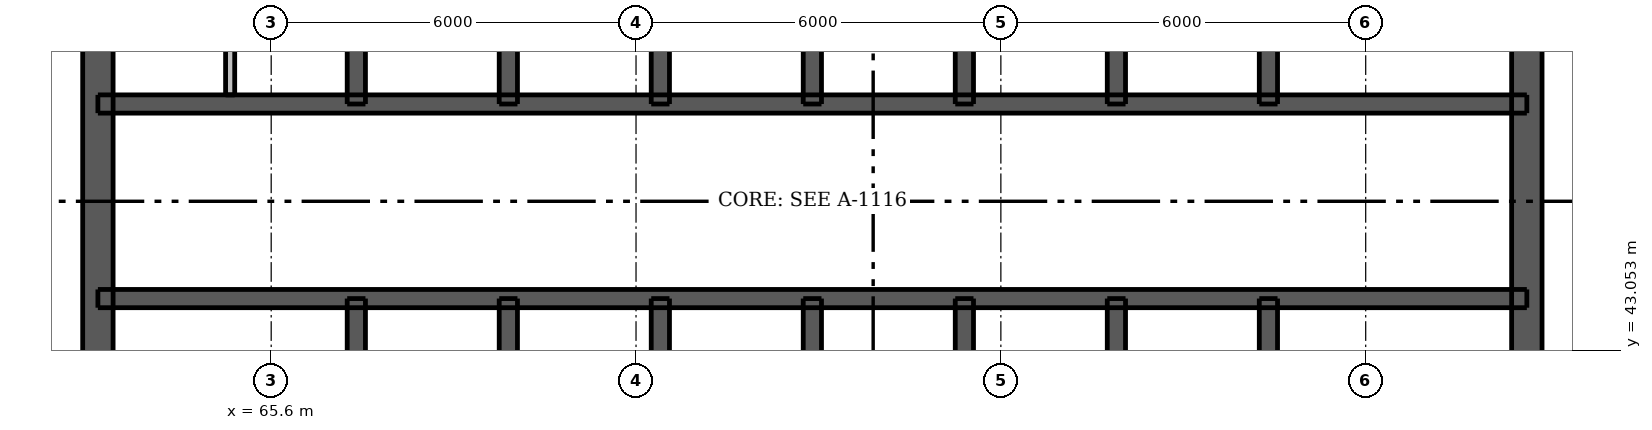
"""IFC4 building model, lengths in metres.
Left out: names, types, materials, properties, quantities, classifications, styles, units other than length and angle.
Written with IfcOpenShell. Run it as: python <this file> out.ifc"""

import sys

from ifc_helpers import new_model, si_unit, direction, frame, frame_2d, origin, place, context, subcontext, project, spatial, rectangle, extrude, element, fill, save


model = new_model("IFC4")
c1 = context("Model", 3, precision=1e-05, world=origin(), true_north=direction((0.0, 1.0)))
c2 = subcontext(c1, "Body", "Model", "MODEL_VIEW")
j1 = project(units=[si_unit("LENGTHUNIT", "METRE"), si_unit("PLANEANGLEUNIT", "RADIAN")], contexts=[c1])
p1 = place(None, origin())
s1 = spatial("IfcSite", under=j1, at=p1, CompositionType="ELEMENT")
p2 = place(p1, origin())
s2 = spatial("IfcBuilding", under=s1, at=p2, CompositionType="ELEMENT")
p3 = place(p2, frame((0.0, 0.0, 242.2)))
s3 = spatial("IfcBuildingStorey", under=s2, at=p3, CompositionType="ELEMENT", Elevation=242.2)
p4 = place(p3, frame((62.75, 33.5, 0.0), z_axis=(0.0, 0.0, 1.0), x_axis=(0.0, 1.0, 0.0)))
e1 = element("IfcWall", 1, at=p4, inside=s3, PredefinedType="SHEAR", context=c2, shape_type="SweptSolid", body=[
    extrude(rectangle(XDim=24.0, YDim=0.5, at=frame_2d((12.0, 0.0))), origin(), (0.0, 0.0, 1.0), 3.05),
])
p5 = place(p4, frame((11.2, 0.0, 0.0)))
e2 = element("IfcOpeningElement", 2, at=p5, cuts=e1, PredefinedType="OPENING", context=c2, shape_type="SweptSolid", body=[
    extrude(rectangle(XDim=1.6, YDim=2.1, at=frame_2d((0.8, 1.05))), frame((0.0, 0.26, 0.0), z_axis=(0.0, -1.0, 0.0), x_axis=(1.0, 0.0, 0.0)), (0.0, 0.0, 1.0), 0.52),
])
p6 = place(p3, frame((86.25, 33.5, 0.0), z_axis=(0.0, 0.0, 1.0), x_axis=(0.0, 1.0, 0.0)))
e3 = element("IfcWall", 3, at=p6, inside=s3, PredefinedType="SHEAR", context=c2, shape_type="SweptSolid", body=[
    extrude(rectangle(XDim=24.0, YDim=0.5, at=frame_2d((12.0, 0.0))), origin(), (0.0, 0.0, 1.0), 3.05),
])
p7 = place(p6, frame((11.2, 0.0, 0.0)))
e4 = element("IfcOpeningElement", 4, at=p7, cuts=e3, PredefinedType="OPENING", context=c2, shape_type="SweptSolid", body=[
    extrude(rectangle(XDim=1.6, YDim=2.1, at=frame_2d((0.8, 1.05))), frame((0.0, 0.26, 0.0), z_axis=(0.0, -1.0, 0.0), x_axis=(1.0, 0.0, 0.0)), (0.0, 0.0, 1.0), 0.52),
])
p8 = place(p3, frame((62.75, 43.9, 0.0), z_axis=(0.0, 0.0, 1.0), x_axis=(1.0, 0.0, 0.0)))
e5 = element("IfcWall", 5, at=p8, inside=s3, PredefinedType="SHEAR", context=c2, shape_type="SweptSolid", body=[
    extrude(rectangle(XDim=23.5, YDim=0.3, at=frame_2d((11.75, 0.0))), origin(), (0.0, 0.0, 1.0), 3.05),
])
p9 = place(p8, frame((1.725, 0.0, 0.0)))
e6 = element("IfcOpeningElement", 6, at=p9, cuts=e5, PredefinedType="OPENING", context=c2, shape_type="SweptSolid", body=[
    extrude(rectangle(XDim=0.9, YDim=2.1, at=frame_2d((0.45, 1.05))), frame((0.0, 0.16, 0.0), z_axis=(0.0, -1.0, 0.0), x_axis=(1.0, 0.0, 0.0)), (0.0, 0.0, 1.0), 0.32),
])
p10 = place(p8, frame((20.875, 0.0, 0.0)))
e7 = element("IfcOpeningElement", 7, at=p10, cuts=e5, PredefinedType="OPENING", context=c2, shape_type="SweptSolid", body=[
    extrude(rectangle(XDim=0.9, YDim=2.1, at=frame_2d((0.45, 1.05))), frame((0.0, 0.16, 0.0), z_axis=(0.0, -1.0, 0.0), x_axis=(1.0, 0.0, 0.0)), (0.0, 0.0, 1.0), 0.32),
])
p11 = place(p8, frame((7.55, 0.0, 0.0)))
e8 = element("IfcOpeningElement", 8, at=p11, cuts=e5, PredefinedType="OPENING", context=c2, shape_type="SweptSolid", body=[
    extrude(rectangle(XDim=0.9, YDim=2.1, at=frame_2d((0.45, 1.05))), frame((0.0, 0.16, 0.0), z_axis=(0.0, -1.0, 0.0), x_axis=(1.0, 0.0, 0.0)), (0.0, 0.0, 1.0), 0.32),
])
p12 = place(p8, frame((10.05, 0.0, 0.0)))
e9 = element("IfcOpeningElement", 9, at=p12, cuts=e5, PredefinedType="OPENING", context=c2, shape_type="SweptSolid", body=[
    extrude(rectangle(XDim=0.9, YDim=2.1, at=frame_2d((0.45, 1.05))), frame((0.0, 0.16, 0.0), z_axis=(0.0, -1.0, 0.0), x_axis=(1.0, 0.0, 0.0)), (0.0, 0.0, 1.0), 0.32),
])
p13 = place(p8, frame((15.05, 0.0, 0.0)))
e10 = element("IfcOpeningElement", 10, at=p13, cuts=e5, PredefinedType="OPENING", context=c2, shape_type="SweptSolid", body=[
    extrude(rectangle(XDim=0.9, YDim=2.1, at=frame_2d((0.45, 1.05))), frame((0.0, 0.16, 0.0), z_axis=(0.0, -1.0, 0.0), x_axis=(1.0, 0.0, 0.0)), (0.0, 0.0, 1.0), 0.32),
])
p14 = place(p8, frame((17.55, 0.0, 0.0)))
e11 = element("IfcOpeningElement", 11, at=p14, cuts=e5, PredefinedType="OPENING", context=c2, shape_type="SweptSolid", body=[
    extrude(rectangle(XDim=0.9, YDim=2.1, at=frame_2d((0.45, 1.05))), frame((0.0, 0.16, 0.0), z_axis=(0.0, -1.0, 0.0), x_axis=(1.0, 0.0, 0.0)), (0.0, 0.0, 1.0), 0.32),
])
p15 = place(p3, frame((62.75, 47.1, 0.0), z_axis=(0.0, 0.0, 1.0), x_axis=(1.0, 0.0, 0.0)))
e12 = element("IfcWall", 12, at=p15, inside=s3, PredefinedType="SHEAR", context=c2, shape_type="SweptSolid", body=[
    extrude(rectangle(XDim=23.5, YDim=0.3, at=frame_2d((11.75, 0.0))), origin(), (0.0, 0.0, 1.0), 3.05),
])
p16 = place(p15, frame((0.762, 0.0, 0.0)))
e13 = element("IfcOpeningElement", 13, at=p16, cuts=e12, PredefinedType="OPENING", context=c2, shape_type="SweptSolid", body=[
    extrude(rectangle(XDim=0.9, YDim=2.1, at=frame_2d((0.45, 1.05))), frame((0.0, 0.16, 0.0), z_axis=(0.0, -1.0, 0.0), x_axis=(1.0, 0.0, 0.0)), (0.0, 0.0, 1.0), 0.32),
])
p17 = place(p15, frame((2.688, 0.0, 0.0)))
e14 = element("IfcOpeningElement", 14, at=p17, cuts=e12, PredefinedType="OPENING", context=c2, shape_type="SweptSolid", body=[
    extrude(rectangle(XDim=0.9, YDim=2.1, at=frame_2d((0.45, 1.05))), frame((0.0, 0.16, 0.0), z_axis=(0.0, -1.0, 0.0), x_axis=(1.0, 0.0, 0.0)), (0.0, 0.0, 1.0), 0.32),
])
p18 = place(p15, frame((20.875, 0.0, 0.0)))
e15 = element("IfcOpeningElement", 15, at=p18, cuts=e12, PredefinedType="OPENING", context=c2, shape_type="SweptSolid", body=[
    extrude(rectangle(XDim=0.9, YDim=2.1, at=frame_2d((0.45, 1.05))), frame((0.0, 0.16, 0.0), z_axis=(0.0, -1.0, 0.0), x_axis=(1.0, 0.0, 0.0)), (0.0, 0.0, 1.0), 0.32),
])
p19 = place(p15, frame((4.95, 0.0, 0.0)))
e16 = element("IfcOpeningElement", 16, at=p19, cuts=e12, PredefinedType="OPENING", context=c2, shape_type="SweptSolid", body=[
    extrude(rectangle(XDim=1.1, YDim=2.1, at=frame_2d((0.55, 1.05))), frame((0.0, 0.16, 0.0), z_axis=(0.0, -1.0, 0.0), x_axis=(1.0, 0.0, 0.0)), (0.0, 0.0, 1.0), 0.32),
])
p20 = place(p15, frame((7.45, 0.0, 0.0)))
e17 = element("IfcOpeningElement", 17, at=p20, cuts=e12, PredefinedType="OPENING", context=c2, shape_type="SweptSolid", body=[
    extrude(rectangle(XDim=1.1, YDim=2.1, at=frame_2d((0.55, 1.05))), frame((0.0, 0.16, 0.0), z_axis=(0.0, -1.0, 0.0), x_axis=(1.0, 0.0, 0.0)), (0.0, 0.0, 1.0), 0.32),
])
p21 = place(p15, frame((9.95, 0.0, 0.0)))
e18 = element("IfcOpeningElement", 18, at=p21, cuts=e12, PredefinedType="OPENING", context=c2, shape_type="SweptSolid", body=[
    extrude(rectangle(XDim=1.1, YDim=2.1, at=frame_2d((0.55, 1.05))), frame((0.0, 0.16, 0.0), z_axis=(0.0, -1.0, 0.0), x_axis=(1.0, 0.0, 0.0)), (0.0, 0.0, 1.0), 0.32),
])
p22 = place(p15, frame((12.45, 0.0, 0.0)))
e19 = element("IfcOpeningElement", 19, at=p22, cuts=e12, PredefinedType="OPENING", context=c2, shape_type="SweptSolid", body=[
    extrude(rectangle(XDim=1.1, YDim=2.1, at=frame_2d((0.55, 1.05))), frame((0.0, 0.16, 0.0), z_axis=(0.0, -1.0, 0.0), x_axis=(1.0, 0.0, 0.0)), (0.0, 0.0, 1.0), 0.32),
])
p23 = place(p15, frame((14.95, 0.0, 0.0)))
e20 = element("IfcOpeningElement", 20, at=p23, cuts=e12, PredefinedType="OPENING", context=c2, shape_type="SweptSolid", body=[
    extrude(rectangle(XDim=1.1, YDim=2.1, at=frame_2d((0.55, 1.05))), frame((0.0, 0.16, 0.0), z_axis=(0.0, -1.0, 0.0), x_axis=(1.0, 0.0, 0.0)), (0.0, 0.0, 1.0), 0.32),
])
p24 = place(p15, frame((17.45, 0.0, 0.0)))
e21 = element("IfcOpeningElement", 21, at=p24, cuts=e12, PredefinedType="OPENING", context=c2, shape_type="SweptSolid", body=[
    extrude(rectangle(XDim=1.1, YDim=2.1, at=frame_2d((0.55, 1.05))), frame((0.0, 0.16, 0.0), z_axis=(0.0, -1.0, 0.0), x_axis=(1.0, 0.0, 0.0)), (0.0, 0.0, 1.0), 0.32),
])
p25 = place(p3, frame((67.0, 33.75, 0.0), z_axis=(0.0, 0.0, 1.0), x_axis=(0.0, 1.0, 0.0)))
e22 = element("IfcWall", 22, at=p25, inside=s3, PredefinedType="SHEAR", context=c2, shape_type="SweptSolid", body=[
    extrude(rectangle(XDim=10.15, YDim=0.3, at=frame_2d((5.075, 0.0))), origin(), (0.0, 0.0, 1.0), 3.05),
])
p26 = place(p25, frame((0.45, 0.0, 0.0)))
e23 = element("IfcOpeningElement", 23, at=p26, cuts=e22, PredefinedType="OPENING", context=c2, shape_type="SweptSolid", body=[
    extrude(rectangle(XDim=1.1, YDim=2.1, at=frame_2d((0.55, 1.05))), frame((0.0, 0.16, 0.0), z_axis=(0.0, -1.0, 0.0), x_axis=(1.0, 0.0, 0.0)), (0.0, 0.0, 1.0), 0.32),
])
for number, where, z_axis, x_axis in (
    (24, (67.0, 47.1, 0.0), (0.0, 0.0, 1.0), (0.0, 1.0, 0.0)),
    (25, (82.0, 33.75, 0.0), (0.0, 0.0, 1.0), (0.0, 1.0, 0.0)),
    (26, (82.0, 47.1, 0.0), (0.0, 0.0, 1.0), (0.0, 1.0, 0.0)),
):
    element("IfcWall", number, at=place(p3, frame(where, z_axis=z_axis, x_axis=x_axis)), inside=s3, PredefinedType="SHEAR", context=c2, shape_type="SweptSolid", body=[
        extrude(rectangle(XDim=10.15, YDim=0.3, at=frame_2d((5.075, 0.0))), origin(), (0.0, 0.0, 1.0), 3.05),
    ])
for number, where, z_axis, x_axis in (
    (27, (69.5, 41.0, 0.0), (0.0, 0.0, 1.0), (0.0, 1.0, 0.0)),
    (28, (69.5, 47.1, 0.0), (0.0, 0.0, 1.0), (0.0, 1.0, 0.0)),
    (29, (72.0, 41.0, 0.0), (0.0, 0.0, 1.0), (0.0, 1.0, 0.0)),
    (30, (72.0, 47.1, 0.0), (0.0, 0.0, 1.0), (0.0, 1.0, 0.0)),
    (31, (74.5, 41.0, 0.0), (0.0, 0.0, 1.0), (0.0, 1.0, 0.0)),
    (32, (74.5, 47.1, 0.0), (0.0, 0.0, 1.0), (0.0, 1.0, 0.0)),
    (33, (77.0, 41.0, 0.0), (0.0, 0.0, 1.0), (0.0, 1.0, 0.0)),
    (34, (77.0, 47.1, 0.0), (0.0, 0.0, 1.0), (0.0, 1.0, 0.0)),
    (35, (79.5, 41.0, 0.0), (0.0, 0.0, 1.0), (0.0, 1.0, 0.0)),
    (36, (79.5, 47.1, 0.0), (0.0, 0.0, 1.0), (0.0, 1.0, 0.0)),
):
    element("IfcWall", number, at=place(p3, frame(where, z_axis=z_axis, x_axis=x_axis)), inside=s3, PredefinedType="SHEAR", context=c2, shape_type="SweptSolid", body=[
        extrude(rectangle(XDim=2.9, YDim=0.3, at=frame_2d((1.45, 0.0))), origin(), (0.0, 0.0, 1.0), 3.05),
    ])
p27 = place(p3, frame((64.925, 47.25, 0.0), z_axis=(0.0, 0.0, 1.0), x_axis=(0.0, 1.0, 0.0)))
e37 = element("IfcWall", 37, at=p27, inside=s3, PredefinedType="PLUMBINGWALL", context=c2, shape_type="SweptSolid", body=[
    extrude(rectangle(XDim=2.6, YDim=0.15, at=frame_2d((1.3, 0.0))), origin(), (0.0, 0.0, 1.0), 3.05),
])
p28 = place(p5, origin())
e38 = element("IfcDoor", 38, at=p28, inside=s3, OperationType="DOUBLE_DOOR_SINGLE_SWING", PredefinedType="DOOR", context=c2, shape_type="SweptSolid", body=[
    extrude(rectangle(XDim=1.6, YDim=2.1, at=frame_2d((0.8, 1.05))), frame((0.0, -0.188, 0.0), z_axis=(0.0, -1.0, 0.0), x_axis=(1.0, 0.0, 0.0)), (0.0, 0.0, 1.0), 0.05),
])
fill(e2, e38)
p29 = place(p7, origin())
e39 = element("IfcDoor", 39, at=p29, inside=s3, OperationType="DOUBLE_DOOR_SINGLE_SWING", PredefinedType="DOOR", context=c2, shape_type="SweptSolid", body=[
    extrude(rectangle(XDim=1.6, YDim=2.1, at=frame_2d((0.8, 1.05))), frame((0.0, 0.237, 0.0), z_axis=(0.0, -1.0, 0.0), x_axis=(1.0, 0.0, 0.0)), (0.0, 0.0, 1.0), 0.05),
])
fill(e4, e39)
p30 = place(p9, origin())
e40 = element("IfcDoor", 40, at=p30, inside=s3, OperationType="SINGLE_SWING_LEFT", PredefinedType="DOOR", context=c2, shape_type="SweptSolid", body=[
    extrude(rectangle(XDim=0.9, YDim=2.1, at=frame_2d((0.45, 1.05))), frame((0.0, -0.087, 0.0), z_axis=(0.0, -1.0, 0.0), x_axis=(1.0, 0.0, 0.0)), (0.0, 0.0, 1.0), 0.05),
])
fill(e6, e40)
p31 = place(p10, origin())
e41 = element("IfcDoor", 41, at=p31, inside=s3, OperationType="SINGLE_SWING_LEFT", PredefinedType="DOOR", context=c2, shape_type="SweptSolid", body=[
    extrude(rectangle(XDim=0.9, YDim=2.1, at=frame_2d((0.45, 1.05))), frame((0.0, -0.087, 0.0), z_axis=(0.0, -1.0, 0.0), x_axis=(1.0, 0.0, 0.0)), (0.0, 0.0, 1.0), 0.05),
])
fill(e7, e41)
p32 = place(p16, origin())
e42 = element("IfcDoor", 42, at=p32, inside=s3, OperationType="SINGLE_SWING_LEFT", PredefinedType="DOOR", context=c2, shape_type="SweptSolid", body=[
    extrude(rectangle(XDim=0.9, YDim=2.1, at=frame_2d((0.45, 1.05))), frame((0.0, 0.138, 0.0), z_axis=(0.0, -1.0, 0.0), x_axis=(1.0, 0.0, 0.0)), (0.0, 0.0, 1.0), 0.05),
])
fill(e13, e42)
p33 = place(p17, origin())
e43 = element("IfcDoor", 43, at=p33, inside=s3, OperationType="SINGLE_SWING_RIGHT", PredefinedType="DOOR", context=c2, shape_type="SweptSolid", body=[
    extrude(rectangle(XDim=0.9, YDim=2.1, at=frame_2d((0.45, 1.05))), frame((0.0, 0.138, 0.0), z_axis=(0.0, -1.0, 0.0), x_axis=(1.0, 0.0, 0.0)), (0.0, 0.0, 1.0), 0.05),
])
fill(e14, e43)
p34 = place(p18, origin())
e44 = element("IfcDoor", 44, at=p34, inside=s3, OperationType="SINGLE_SWING_LEFT", PredefinedType="DOOR", context=c2, shape_type="SweptSolid", body=[
    extrude(rectangle(XDim=0.9, YDim=2.1, at=frame_2d((0.45, 1.05))), frame((0.0, 0.138, 0.0), z_axis=(0.0, -1.0, 0.0), x_axis=(1.0, 0.0, 0.0)), (0.0, 0.0, 1.0), 0.05),
])
fill(e15, e44)
p35 = place(p11, origin())
e45 = element("IfcDoor", 45, at=p35, inside=s3, OperationType="SINGLE_SWING_LEFT", PredefinedType="DOOR", context=c2, shape_type="SweptSolid", body=[
    extrude(rectangle(XDim=0.9, YDim=2.1, at=frame_2d((0.45, 1.05))), frame((0.0, -0.087, 0.0), z_axis=(0.0, -1.0, 0.0), x_axis=(1.0, 0.0, 0.0)), (0.0, 0.0, 1.0), 0.05),
])
fill(e8, e45)
p36 = place(p12, origin())
e46 = element("IfcDoor", 46, at=p36, inside=s3, OperationType="SINGLE_SWING_RIGHT", PredefinedType="DOOR", context=c2, shape_type="SweptSolid", body=[
    extrude(rectangle(XDim=0.9, YDim=2.1, at=frame_2d((0.45, 1.05))), frame((0.0, -0.087, 0.0), z_axis=(0.0, -1.0, 0.0), x_axis=(1.0, 0.0, 0.0)), (0.0, 0.0, 1.0), 0.05),
])
fill(e9, e46)
p37 = place(p13, origin())
e47 = element("IfcDoor", 47, at=p37, inside=s3, OperationType="SINGLE_SWING_RIGHT", PredefinedType="DOOR", context=c2, shape_type="SweptSolid", body=[
    extrude(rectangle(XDim=0.9, YDim=2.1, at=frame_2d((0.45, 1.05))), frame((0.0, -0.087, 0.0), z_axis=(0.0, -1.0, 0.0), x_axis=(1.0, 0.0, 0.0)), (0.0, 0.0, 1.0), 0.05),
])
fill(e10, e47)
p38 = place(p14, origin())
e48 = element("IfcDoor", 48, at=p38, inside=s3, OperationType="SINGLE_SWING_LEFT", PredefinedType="DOOR", context=c2, shape_type="SweptSolid", body=[
    extrude(rectangle(XDim=0.9, YDim=2.1, at=frame_2d((0.45, 1.05))), frame((0.0, -0.087, 0.0), z_axis=(0.0, -1.0, 0.0), x_axis=(1.0, 0.0, 0.0)), (0.0, 0.0, 1.0), 0.05),
])
fill(e11, e48)
p39 = place(p19, origin())
e49 = element("IfcDoor", 49, at=p39, inside=s3, OperationType="DOUBLE_DOOR_SLIDING", PredefinedType="DOOR", context=c2, shape_type="SweptSolid", body=[
    extrude(rectangle(XDim=1.1, YDim=2.1, at=frame_2d((0.55, 1.05))), frame((0.0, 0.025, 0.0), z_axis=(0.0, -1.0, 0.0), x_axis=(1.0, 0.0, 0.0)), (0.0, 0.0, 1.0), 0.05),
])
fill(e16, e49)
p40 = place(p20, origin())
e50 = element("IfcDoor", 50, at=p40, inside=s3, OperationType="DOUBLE_DOOR_SLIDING", PredefinedType="DOOR", context=c2, shape_type="SweptSolid", body=[
    extrude(rectangle(XDim=1.1, YDim=2.1, at=frame_2d((0.55, 1.05))), frame((0.0, 0.025, 0.0), z_axis=(0.0, -1.0, 0.0), x_axis=(1.0, 0.0, 0.0)), (0.0, 0.0, 1.0), 0.05),
])
fill(e17, e50)
p41 = place(p21, origin())
e51 = element("IfcDoor", 51, at=p41, inside=s3, OperationType="DOUBLE_DOOR_SLIDING", PredefinedType="DOOR", context=c2, shape_type="SweptSolid", body=[
    extrude(rectangle(XDim=1.1, YDim=2.1, at=frame_2d((0.55, 1.05))), frame((0.0, 0.025, 0.0), z_axis=(0.0, -1.0, 0.0), x_axis=(1.0, 0.0, 0.0)), (0.0, 0.0, 1.0), 0.05),
])
fill(e18, e51)
p42 = place(p22, origin())
e52 = element("IfcDoor", 52, at=p42, inside=s3, OperationType="DOUBLE_DOOR_SLIDING", PredefinedType="DOOR", context=c2, shape_type="SweptSolid", body=[
    extrude(rectangle(XDim=1.1, YDim=2.1, at=frame_2d((0.55, 1.05))), frame((0.0, 0.025, 0.0), z_axis=(0.0, -1.0, 0.0), x_axis=(1.0, 0.0, 0.0)), (0.0, 0.0, 1.0), 0.05),
])
fill(e19, e52)
p43 = place(p23, origin())
e53 = element("IfcDoor", 53, at=p43, inside=s3, OperationType="DOUBLE_DOOR_SLIDING", PredefinedType="DOOR", context=c2, shape_type="SweptSolid", body=[
    extrude(rectangle(XDim=1.1, YDim=2.1, at=frame_2d((0.55, 1.05))), frame((0.0, 0.025, 0.0), z_axis=(0.0, -1.0, 0.0), x_axis=(1.0, 0.0, 0.0)), (0.0, 0.0, 1.0), 0.05),
])
fill(e20, e53)
p44 = place(p24, origin())
e54 = element("IfcDoor", 54, at=p44, inside=s3, OperationType="DOUBLE_DOOR_SLIDING", PredefinedType="DOOR", context=c2, shape_type="SweptSolid", body=[
    extrude(rectangle(XDim=1.1, YDim=2.1, at=frame_2d((0.55, 1.05))), frame((0.0, 0.025, 0.0), z_axis=(0.0, -1.0, 0.0), x_axis=(1.0, 0.0, 0.0)), (0.0, 0.0, 1.0), 0.05),
])
fill(e21, e54)
save(model, sys.argv[1])
